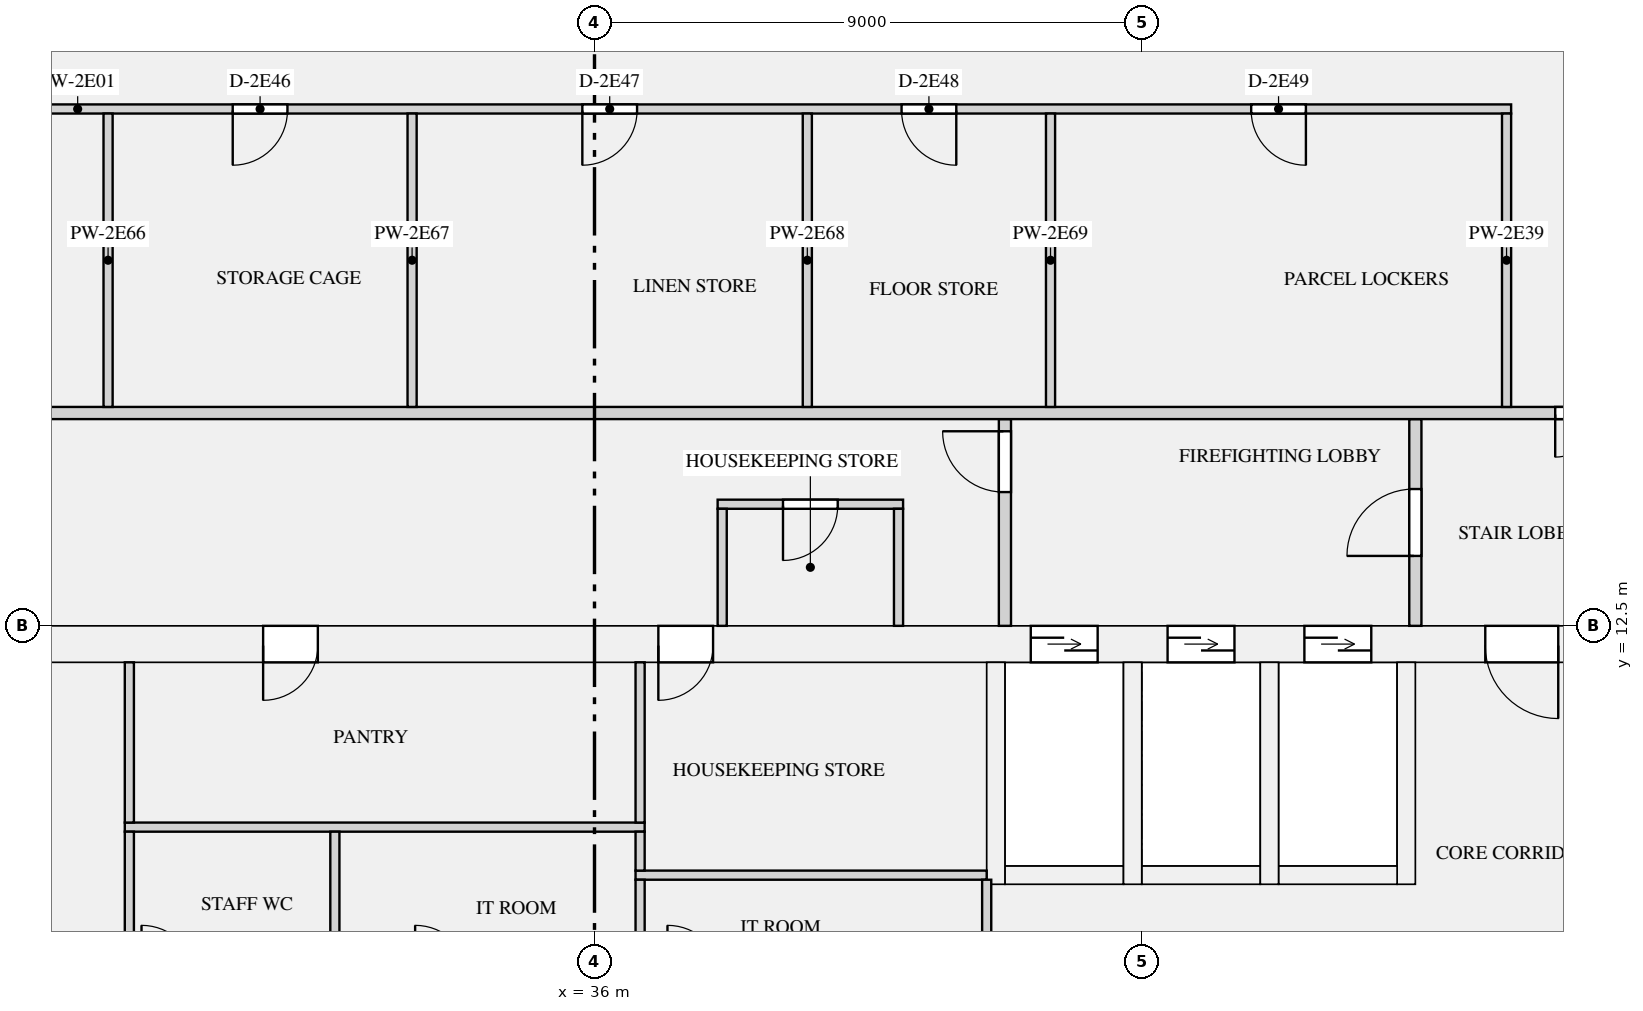
"""IFC4 building model, lengths in metres.
Left out: names, types, materials, properties, quantities, classifications, styles, units other than length and angle.
Written with IfcOpenShell. Run it as: python <this file> out.ifc"""

import sys

from ifc_helpers import new_model, si_unit, direction, frame, frame_2d, origin, place, context, subcontext, project, spatial, rectangle, extrude, element, fill, save


model = new_model("IFC4")
c1 = context("Model", 3, precision=1e-05, world=origin(), true_north=direction((0.0, 1.0)))
c2 = subcontext(c1, "Body", "Model", "MODEL_VIEW")
j1 = project(units=[si_unit("LENGTHUNIT", "METRE"), si_unit("PLANEANGLEUNIT", "RADIAN")], contexts=[c1])
p1 = place(None, origin())
s1 = spatial("IfcSite", under=j1, at=p1, CompositionType="ELEMENT")
p2 = place(p1, origin())
s2 = spatial("IfcBuilding", under=s1, at=p2, CompositionType="ELEMENT")
p3 = place(p2, frame((0.0, 0.0, 118.2)))
s3 = spatial("IfcBuildingStorey", under=s2, at=p3, CompositionType="ELEMENT", Elevation=118.2)
p4 = place(p3, frame((18.8, 12.2, 0.0), z_axis=(0.0, 0.0, 1.0), x_axis=(1.0, 0.0, 0.0)))
e1 = element("IfcWall", 1, at=p4, inside=s3, PredefinedType="SHEAR", context=c2, shape_type="SweptSolid", body=[
    extrude(rectangle(XDim=34.4, YDim=0.6, at=frame_2d((17.2, 0.0))), origin(), (0.0, 0.0, 1.0), 3.15),
])
p5 = place(p4, frame((24.375, 0.0, 0.0)))
e2 = element("IfcOpeningElement", 2, at=p5, cuts=e1, PredefinedType="OPENING", context=c2, shape_type="SweptSolid", body=[
    extrude(rectangle(XDim=1.1, YDim=2.1, at=frame_2d((0.55, 1.05))), frame((0.0, 0.31, 0.0), z_axis=(0.0, -1.0, 0.0), x_axis=(1.0, 0.0, 0.0)), (0.0, 0.0, 1.0), 0.62),
])
p6 = place(p4, frame((26.625, 0.0, 0.0)))
e3 = element("IfcOpeningElement", 3, at=p6, cuts=e1, PredefinedType="OPENING", context=c2, shape_type="SweptSolid", body=[
    extrude(rectangle(XDim=1.1, YDim=2.1, at=frame_2d((0.55, 1.05))), frame((0.0, 0.31, 0.0), z_axis=(0.0, -1.0, 0.0), x_axis=(1.0, 0.0, 0.0)), (0.0, 0.0, 1.0), 0.62),
])
p7 = place(p4, frame((28.875, 0.0, 0.0)))
e4 = element("IfcOpeningElement", 4, at=p7, cuts=e1, PredefinedType="OPENING", context=c2, shape_type="SweptSolid", body=[
    extrude(rectangle(XDim=1.1, YDim=2.1, at=frame_2d((0.55, 1.05))), frame((0.0, 0.31, 0.0), z_axis=(0.0, -1.0, 0.0), x_axis=(1.0, 0.0, 0.0)), (0.0, 0.0, 1.0), 0.62),
])
p8 = place(p4, frame((11.75, 0.0, 0.0)))
e5 = element("IfcOpeningElement", 5, at=p8, cuts=e1, PredefinedType="OPENING", context=c2, shape_type="SweptSolid", body=[
    extrude(rectangle(XDim=0.9, YDim=2.1, at=frame_2d((0.45, 1.05))), frame((0.0, 0.31, 0.0), z_axis=(0.0, -1.0, 0.0), x_axis=(1.0, 0.0, 0.0)), (0.0, 0.0, 1.0), 0.62),
])
p9 = place(p4, frame((18.25, 0.0, 0.0)))
e6 = element("IfcOpeningElement", 6, at=p9, cuts=e1, PredefinedType="OPENING", context=c2, shape_type="SweptSolid", body=[
    extrude(rectangle(XDim=0.9, YDim=2.1, at=frame_2d((0.45, 1.05))), frame((0.0, 0.31, 0.0), z_axis=(0.0, -1.0, 0.0), x_axis=(1.0, 0.0, 0.0)), (0.0, 0.0, 1.0), 0.62),
])
p10 = place(p4, frame((1.35, 0.0, 0.0)))
e7 = element("IfcOpeningElement", 7, at=p10, cuts=e1, PredefinedType="OPENING", context=c2, shape_type="SweptSolid", body=[
    extrude(rectangle(XDim=1.2, YDim=2.1, at=frame_2d((0.6, 1.05))), frame((0.0, 0.31, 0.0), z_axis=(0.0, -1.0, 0.0), x_axis=(1.0, 0.0, 0.0)), (0.0, 0.0, 1.0), 0.62),
])
p11 = place(p4, frame((31.85, 0.0, 0.0)))
e8 = element("IfcOpeningElement", 8, at=p11, cuts=e1, PredefinedType="OPENING", context=c2, shape_type="SweptSolid", body=[
    extrude(rectangle(XDim=1.2, YDim=2.1, at=frame_2d((0.6, 1.05))), frame((0.0, 0.31, 0.0), z_axis=(0.0, -1.0, 0.0), x_axis=(1.0, 0.0, 0.0)), (0.0, 0.0, 1.0), 0.62),
])
p12 = place(p3, frame((42.75, 8.4, 0.0), z_axis=(0.0, 0.0, 1.0), x_axis=(1.0, 0.0, 0.0)))
e9 = element("IfcWall", 9, at=p12, inside=s3, PredefinedType="SHEAR", context=c2, shape_type="SweptSolid", body=[
    extrude(rectangle(XDim=1.95, YDim=0.3, at=frame_2d((0.975, 0.0))), origin(), (0.0, 0.0, 1.0), 3.15),
])
p13 = place(p3, frame((42.6, 8.25, 0.0), z_axis=(0.0, 0.0, 1.0), x_axis=(0.0, 1.0, 0.0)))
e10 = element("IfcWall", 10, at=p13, inside=s3, PredefinedType="SHEAR", context=c2, shape_type="SweptSolid", body=[
    extrude(rectangle(XDim=3.65, YDim=0.3, at=frame_2d((1.825, 0.0))), origin(), (0.0, 0.0, 1.0), 3.15),
])
p14 = place(p3, frame((45.0, 8.4, 0.0), z_axis=(0.0, 0.0, 1.0), x_axis=(1.0, 0.0, 0.0)))
e11 = element("IfcWall", 11, at=p14, inside=s3, PredefinedType="SHEAR", context=c2, shape_type="SweptSolid", body=[
    extrude(rectangle(XDim=1.95, YDim=0.3, at=frame_2d((0.975, 0.0))), origin(), (0.0, 0.0, 1.0), 3.15),
])
p15 = place(p3, frame((44.85, 8.25, 0.0), z_axis=(0.0, 0.0, 1.0), x_axis=(0.0, 1.0, 0.0)))
e12 = element("IfcWall", 12, at=p15, inside=s3, PredefinedType="SHEAR", context=c2, shape_type="SweptSolid", body=[
    extrude(rectangle(XDim=3.65, YDim=0.3, at=frame_2d((1.825, 0.0))), origin(), (0.0, 0.0, 1.0), 3.15),
])
p16 = place(p3, frame((47.25, 8.4, 0.0), z_axis=(0.0, 0.0, 1.0), x_axis=(1.0, 0.0, 0.0)))
e13 = element("IfcWall", 13, at=p16, inside=s3, PredefinedType="SHEAR", context=c2, shape_type="SweptSolid", body=[
    extrude(rectangle(XDim=1.95, YDim=0.3, at=frame_2d((0.975, 0.0))), origin(), (0.0, 0.0, 1.0), 3.15),
])
for number, where, z_axis, x_axis in (
    (14, (47.1, 8.25, 0.0), (0.0, 0.0, 1.0), (0.0, 1.0, 0.0)),
    (15, (49.35, 8.25, 0.0), (0.0, 0.0, 1.0), (0.0, 1.0, 0.0)),
):
    element("IfcWall", number, at=place(p3, frame(where, z_axis=z_axis, x_axis=x_axis)), inside=s3, PredefinedType="SHEAR", context=c2, shape_type="SweptSolid", body=[
        extrude(rectangle(XDim=3.65, YDim=0.3, at=frame_2d((1.825, 0.0))), origin(), (0.0, 0.0, 1.0), 3.15),
    ])
p17 = place(p3, frame((36.675, 8.4, 0.0), z_axis=(0.0, 0.0, 1.0), x_axis=(1.0, 0.0, 0.0)))
e16 = element("IfcWall", 16, at=p17, inside=s3, PredefinedType="PARTITIONING", context=c2, shape_type="SweptSolid", body=[
    extrude(rectangle(XDim=5.775, YDim=0.15, at=frame_2d((2.887, 0.0))), origin(), (0.0, 0.0, 1.0), 2.83),
])
p18 = place(p3, frame((28.275, 9.19, 0.0), z_axis=(0.0, 0.0, 1.0), x_axis=(1.0, 0.0, 0.0)))
e17 = element("IfcWall", 17, at=p18, inside=s3, PredefinedType="PARTITIONING", context=c2, shape_type="SweptSolid", body=[
    extrude(rectangle(XDim=8.55, YDim=0.15, at=frame_2d((4.275, 0.0))), origin(), (0.0, 0.0, 1.0), 2.83),
])
p19 = place(p3, frame((38.025, 14.5, 0.0), z_axis=(0.0, 0.0, 1.0), x_axis=(1.0, 0.0, 0.0)))
e18 = element("IfcWall", 18, at=p19, inside=s3, PredefinedType="PARTITIONING", context=c2, shape_type="SweptSolid", body=[
    extrude(rectangle(XDim=3.05, YDim=0.15, at=frame_2d((1.525, 0.0))), origin(), (0.0, 0.0, 1.0), 2.83),
])
p20 = place(p19, frame((1.075, 0.0, 0.0)))
e19 = element("IfcOpeningElement", 19, at=p20, cuts=e18, PredefinedType="OPENING", context=c2, shape_type="SweptSolid", body=[
    extrude(rectangle(XDim=0.9, YDim=2.1, at=frame_2d((0.45, 1.05))), frame((0.0, 0.085, 0.0), z_axis=(0.0, -1.0, 0.0), x_axis=(1.0, 0.0, 0.0)), (0.0, 0.0, 1.0), 0.17),
])
p21 = place(p3, frame((42.45, 6.65, 0.0), z_axis=(0.0, 0.0, 1.0), x_axis=(0.0, 1.0, 0.0)))
e20 = element("IfcWall", 20, at=p21, inside=s3, PredefinedType="PARTITIONING", context=c2, shape_type="SweptSolid", body=[
    extrude(rectangle(XDim=1.675, YDim=0.15, at=frame_2d((0.837, 0.0))), origin(), (0.0, 0.0, 1.0), 2.83),
])
for number, where, z_axis, x_axis in (
    (21, (28.35, 6.725, 0.0), (0.0, 0.0, 1.0), (0.0, 1.0, 0.0)),
    (22, (31.73, 6.725, 0.0), (0.0, 0.0, 1.0), (0.0, 1.0, 0.0)),
):
    element("IfcWall", number, at=place(p3, frame(where, z_axis=z_axis, x_axis=x_axis)), inside=s3, PredefinedType="PARTITIONING", context=c2, shape_type="SweptSolid", body=[
        extrude(rectangle(XDim=2.39, YDim=0.15, at=frame_2d((1.195, 0.0))), origin(), (0.0, 0.0, 1.0), 2.83),
    ])
p22 = place(p3, frame((36.75, 6.725, 0.0), z_axis=(0.0, 0.0, 1.0), x_axis=(0.0, 1.0, 0.0)))
e23 = element("IfcWall", 23, at=p22, inside=s3, PredefinedType="PARTITIONING", context=c2, shape_type="SweptSolid", body=[
    extrude(rectangle(XDim=1.6, YDim=0.15, at=frame_2d((0.8, 0.0))), origin(), (0.0, 0.0, 1.0), 2.83),
])
p23 = place(p3, frame((36.75, 8.475, 0.0), z_axis=(0.0, 0.0, 1.0), x_axis=(0.0, 1.0, 0.0)))
e24 = element("IfcWall", 24, at=p23, inside=s3, PredefinedType="PARTITIONING", context=c2, shape_type="SweptSolid", body=[
    extrude(rectangle(XDim=0.64, YDim=0.15, at=frame_2d((0.32, 0.0))), origin(), (0.0, 0.0, 1.0), 2.83),
])
for number, where, z_axis, x_axis in (
    (25, (28.35, 9.265, 0.0), (0.0, 0.0, 1.0), (0.0, 1.0, 0.0)),
    (26, (36.75, 9.265, 0.0), (0.0, 0.0, 1.0), (0.0, 1.0, 0.0)),
):
    element("IfcWall", number, at=place(p3, frame(where, z_axis=z_axis, x_axis=x_axis)), inside=s3, PredefinedType="PARTITIONING", context=c2, shape_type="SweptSolid", body=[
        extrude(rectangle(XDim=2.635, YDim=0.15, at=frame_2d((1.317, 0.0))), origin(), (0.0, 0.0, 1.0), 2.83),
    ])
for number, where, z_axis, x_axis in (
    (27, (38.1, 12.5, 0.0), (0.0, 0.0, 1.0), (0.0, 1.0, 0.0)),
    (28, (41.0, 12.5, 0.0), (0.0, 0.0, 1.0), (0.0, 1.0, 0.0)),
):
    element("IfcWall", number, at=place(p3, frame(where, z_axis=z_axis, x_axis=x_axis)), inside=s3, PredefinedType="PARTITIONING", context=c2, shape_type="SweptSolid", body=[
        extrude(rectangle(XDim=1.925, YDim=0.15, at=frame_2d((0.962, 0.0))), origin(), (0.0, 0.0, 1.0), 2.83),
    ])
p24 = place(p3, frame((42.75, 12.5, 0.0), z_axis=(0.0, 0.0, 1.0), x_axis=(0.0, 1.0, 0.0)))
e29 = element("IfcWall", 29, at=p24, inside=s3, PredefinedType="PARTITIONING", context=c2, shape_type="SweptSolid", body=[
    extrude(rectangle(XDim=3.4, YDim=0.2, at=frame_2d((1.7, 0.0))), origin(), (0.0, 0.0, 1.0), 2.83),
])
p25 = place(p24, frame((2.2, 0.0, 0.0)))
e30 = element("IfcOpeningElement", 30, at=p25, cuts=e29, PredefinedType="OPENING", context=c2, shape_type="SweptSolid", body=[
    extrude(rectangle(XDim=1.0, YDim=2.1, at=frame_2d((0.5, 1.05))), frame((0.0, 0.11, 0.0), z_axis=(0.0, -1.0, 0.0), x_axis=(1.0, 0.0, 0.0)), (0.0, 0.0, 1.0), 0.22),
])
p26 = place(p3, frame((49.5, 12.5, 0.0), z_axis=(0.0, 0.0, 1.0), x_axis=(0.0, 1.0, 0.0)))
e31 = element("IfcWall", 31, at=p26, inside=s3, PredefinedType="PARTITIONING", context=c2, shape_type="SweptSolid", body=[
    extrude(rectangle(XDim=3.4, YDim=0.2, at=frame_2d((1.7, 0.0))), origin(), (0.0, 0.0, 1.0), 2.83),
])
p27 = place(p26, frame((1.15, 0.0, 0.0)))
e32 = element("IfcOpeningElement", 32, at=p27, cuts=e31, PredefinedType="OPENING", context=c2, shape_type="SweptSolid", body=[
    extrude(rectangle(XDim=1.1, YDim=2.1, at=frame_2d((0.55, 1.05))), frame((0.0, 0.11, 0.0), z_axis=(0.0, -1.0, 0.0), x_axis=(1.0, 0.0, 0.0)), (0.0, 0.0, 1.0), 0.22),
])
p28 = place(p3, frame((20.925, 21.0, 0.0), z_axis=(0.0, 0.0, 1.0), x_axis=(1.0, 0.0, 0.0)))
e33 = element("IfcWall", 33, at=p28, inside=s3, PredefinedType="PARTITIONING", context=c2, shape_type="SweptSolid", body=[
    extrude(rectangle(XDim=30.15, YDim=0.15, at=frame_2d((15.075, 0.0))), origin(), (0.0, 0.0, 1.0), 2.83),
])
p29 = place(p28, frame((3.125, 0.0, 0.0)))
e34 = element("IfcOpeningElement", 34, at=p29, cuts=e33, PredefinedType="OPENING", context=c2, shape_type="SweptSolid", body=[
    extrude(rectangle(XDim=0.9, YDim=2.1, at=frame_2d((0.45, 1.05))), frame((0.0, 0.085, 0.0), z_axis=(0.0, -1.0, 0.0), x_axis=(1.0, 0.0, 0.0)), (0.0, 0.0, 1.0), 0.17),
])
p30 = place(p28, frame((9.125, 0.0, 0.0)))
e35 = element("IfcOpeningElement", 35, at=p30, cuts=e33, PredefinedType="OPENING", context=c2, shape_type="SweptSolid", body=[
    extrude(rectangle(XDim=0.9, YDim=2.1, at=frame_2d((0.45, 1.05))), frame((0.0, 0.085, 0.0), z_axis=(0.0, -1.0, 0.0), x_axis=(1.0, 0.0, 0.0)), (0.0, 0.0, 1.0), 0.17),
])
p31 = place(p28, frame((14.875, 0.0, 0.0)))
e36 = element("IfcOpeningElement", 36, at=p31, cuts=e33, PredefinedType="OPENING", context=c2, shape_type="SweptSolid", body=[
    extrude(rectangle(XDim=0.9, YDim=2.1, at=frame_2d((0.45, 1.05))), frame((0.0, 0.085, 0.0), z_axis=(0.0, -1.0, 0.0), x_axis=(1.0, 0.0, 0.0)), (0.0, 0.0, 1.0), 0.17),
])
p32 = place(p28, frame((20.125, 0.0, 0.0)))
e37 = element("IfcOpeningElement", 37, at=p32, cuts=e33, PredefinedType="OPENING", context=c2, shape_type="SweptSolid", body=[
    extrude(rectangle(XDim=0.9, YDim=2.1, at=frame_2d((0.45, 1.05))), frame((0.0, 0.085, 0.0), z_axis=(0.0, -1.0, 0.0), x_axis=(1.0, 0.0, 0.0)), (0.0, 0.0, 1.0), 0.17),
])
p33 = place(p28, frame((25.875, 0.0, 0.0)))
e38 = element("IfcOpeningElement", 38, at=p33, cuts=e33, PredefinedType="OPENING", context=c2, shape_type="SweptSolid", body=[
    extrude(rectangle(XDim=0.9, YDim=2.1, at=frame_2d((0.45, 1.05))), frame((0.0, 0.085, 0.0), z_axis=(0.0, -1.0, 0.0), x_axis=(1.0, 0.0, 0.0)), (0.0, 0.0, 1.0), 0.17),
])
p34 = place(p3, frame((17.9, 16.0, 0.0), z_axis=(0.0, 0.0, 1.0), x_axis=(1.0, 0.0, 0.0)))
e39 = element("IfcWall", 39, at=p34, inside=s3, PredefinedType="PARTITIONING", context=c2, shape_type="SweptSolid", body=[
    extrude(rectangle(XDim=36.2, YDim=0.2, at=frame_2d((18.1, 0.0))), origin(), (0.0, 0.0, 1.0), 2.83),
])
p35 = place(p34, frame((0.9, 0.0, 0.0)))
e40 = element("IfcOpeningElement", 40, at=p35, cuts=e39, PredefinedType="OPENING", context=c2, shape_type="SweptSolid", body=[
    extrude(rectangle(XDim=1.4, YDim=2.1, at=frame_2d((0.7, 1.05))), frame((0.0, 0.11, 0.0), z_axis=(0.0, -1.0, 0.0), x_axis=(1.0, 0.0, 0.0)), (0.0, 0.0, 1.0), 0.22),
])
p36 = place(p34, frame((33.9, 0.0, 0.0)))
e41 = element("IfcOpeningElement", 41, at=p36, cuts=e39, PredefinedType="OPENING", context=c2, shape_type="SweptSolid", body=[
    extrude(rectangle(XDim=1.4, YDim=2.1, at=frame_2d((0.7, 1.05))), frame((0.0, 0.11, 0.0), z_axis=(0.0, -1.0, 0.0), x_axis=(1.0, 0.0, 0.0)), (0.0, 0.0, 1.0), 0.22),
])
for number, where, z_axis, x_axis in (
    (42, (51.0, 16.1, 0.0), (0.0, 0.0, 1.0), (0.0, 1.0, 0.0)),
    (43, (28.0, 16.1, 0.0), (0.0, 0.0, 1.0), (0.0, 1.0, 0.0)),
    (44, (33.0, 16.1, 0.0), (0.0, 0.0, 1.0), (0.0, 1.0, 0.0)),
    (45, (39.5, 16.1, 0.0), (0.0, 0.0, 1.0), (0.0, 1.0, 0.0)),
    (46, (43.5, 16.1, 0.0), (0.0, 0.0, 1.0), (0.0, 1.0, 0.0)),
):
    element("IfcWall", number, at=place(p3, frame(where, z_axis=z_axis, x_axis=x_axis)), inside=s3, PredefinedType="PARTITIONING", context=c2, shape_type="SweptSolid", body=[
        extrude(rectangle(XDim=4.825, YDim=0.15, at=frame_2d((2.413, 0.0))), origin(), (0.0, 0.0, 1.0), 2.83),
    ])
p37 = place(p5, origin())
e47 = element("IfcDoor", 47, at=p37, inside=s3, OperationType="DOUBLE_DOOR_SLIDING", PredefinedType="DOOR", context=c2, shape_type="SweptSolid", body=[
    extrude(rectangle(XDim=1.1, YDim=2.1, at=frame_2d((0.55, 1.05))), frame((0.0, 0.025, 0.0), z_axis=(0.0, -1.0, 0.0), x_axis=(1.0, 0.0, 0.0)), (0.0, 0.0, 1.0), 0.05),
])
fill(e2, e47)
p38 = place(p6, origin())
e48 = element("IfcDoor", 48, at=p38, inside=s3, OperationType="DOUBLE_DOOR_SLIDING", PredefinedType="DOOR", context=c2, shape_type="SweptSolid", body=[
    extrude(rectangle(XDim=1.1, YDim=2.1, at=frame_2d((0.55, 1.05))), frame((0.0, 0.025, 0.0), z_axis=(0.0, -1.0, 0.0), x_axis=(1.0, 0.0, 0.0)), (0.0, 0.0, 1.0), 0.05),
])
fill(e3, e48)
p39 = place(p7, origin())
e49 = element("IfcDoor", 49, at=p39, inside=s3, OperationType="DOUBLE_DOOR_SLIDING", PredefinedType="DOOR", context=c2, shape_type="SweptSolid", body=[
    extrude(rectangle(XDim=1.1, YDim=2.1, at=frame_2d((0.55, 1.05))), frame((0.0, 0.025, 0.0), z_axis=(0.0, -1.0, 0.0), x_axis=(1.0, 0.0, 0.0)), (0.0, 0.0, 1.0), 0.05),
])
fill(e4, e49)
p40 = place(p20, frame((0.9, 0.0, 0.0), z_axis=(0.0, 0.0, 1.0), x_axis=(-1.0, 0.0, 0.0)))
e50 = element("IfcDoor", 50, at=p40, inside=s3, OperationType="SINGLE_SWING_RIGHT", PredefinedType="DOOR", context=c2, shape_type="SweptSolid", body=[
    extrude(rectangle(XDim=0.9, YDim=2.1, at=frame_2d((0.45, 1.05))), frame((0.0, 0.025, 0.0), z_axis=(0.0, -1.0, 0.0), x_axis=(1.0, 0.0, 0.0)), (0.0, 0.0, 1.0), 0.05),
])
fill(e19, e50)
p41 = place(p8, frame((0.9, 0.0, 0.0), z_axis=(0.0, 0.0, 1.0), x_axis=(-1.0, 0.0, 0.0)))
e51 = element("IfcDoor", 51, at=p41, inside=s3, OperationType="SINGLE_SWING_RIGHT", PredefinedType="DOOR", context=c2, shape_type="SweptSolid", body=[
    extrude(rectangle(XDim=0.9, YDim=2.1, at=frame_2d((0.45, 1.05))), frame((0.0, 0.025, 0.0), z_axis=(0.0, -1.0, 0.0), x_axis=(1.0, 0.0, 0.0)), (0.0, 0.0, 1.0), 0.05),
])
fill(e5, e51)
p42 = place(p9, frame((0.9, 0.0, 0.0), z_axis=(0.0, 0.0, 1.0), x_axis=(-1.0, 0.0, 0.0)))
e52 = element("IfcDoor", 52, at=p42, inside=s3, OperationType="SINGLE_SWING_RIGHT", PredefinedType="DOOR", context=c2, shape_type="SweptSolid", body=[
    extrude(rectangle(XDim=0.9, YDim=2.1, at=frame_2d((0.45, 1.05))), frame((0.0, 0.025, 0.0), z_axis=(0.0, -1.0, 0.0), x_axis=(1.0, 0.0, 0.0)), (0.0, 0.0, 1.0), 0.05),
])
fill(e6, e52)
p43 = place(p11, frame((1.2, 0.0, 0.0), z_axis=(0.0, 0.0, 1.0), x_axis=(-1.0, 0.0, 0.0)))
e53 = element("IfcDoor", 53, at=p43, inside=s3, OperationType="SINGLE_SWING_LEFT", PredefinedType="DOOR", context=c2, shape_type="SweptSolid", body=[
    extrude(rectangle(XDim=1.2, YDim=2.1, at=frame_2d((0.6, 1.05))), frame((0.0, 0.025, 0.0), z_axis=(0.0, -1.0, 0.0), x_axis=(1.0, 0.0, 0.0)), (0.0, 0.0, 1.0), 0.05),
])
fill(e8, e53)
p44 = place(p25, origin())
e54 = element("IfcDoor", 54, at=p44, inside=s3, OperationType="SINGLE_SWING_RIGHT", PredefinedType="DOOR", context=c2, shape_type="SweptSolid", body=[
    extrude(rectangle(XDim=1.0, YDim=2.1, at=frame_2d((0.5, 1.05))), frame((0.0, 0.025, 0.0), z_axis=(0.0, -1.0, 0.0), x_axis=(1.0, 0.0, 0.0)), (0.0, 0.0, 1.0), 0.05),
])
fill(e30, e54)
p45 = place(p27, origin())
e55 = element("IfcDoor", 55, at=p45, inside=s3, OperationType="SINGLE_SWING_LEFT", PredefinedType="DOOR", context=c2, shape_type="SweptSolid", body=[
    extrude(rectangle(XDim=1.1, YDim=2.1, at=frame_2d((0.55, 1.05))), frame((0.0, 0.025, 0.0), z_axis=(0.0, -1.0, 0.0), x_axis=(1.0, 0.0, 0.0)), (0.0, 0.0, 1.0), 0.05),
])
fill(e32, e55)
p46 = place(p36, frame((1.4, 0.0, 0.0), z_axis=(0.0, 0.0, 1.0), x_axis=(-1.0, 0.0, 0.0)))
e56 = element("IfcDoor", 56, at=p46, inside=s3, OperationType="DOUBLE_DOOR_SINGLE_SWING", PredefinedType="DOOR", context=c2, shape_type="SweptSolid", body=[
    extrude(rectangle(XDim=1.4, YDim=2.1, at=frame_2d((0.7, 1.05))), frame((0.0, 0.025, 0.0), z_axis=(0.0, -1.0, 0.0), x_axis=(1.0, 0.0, 0.0)), (0.0, 0.0, 1.0), 0.05),
])
fill(e41, e56)
p47 = place(p30, frame((0.9, 0.0, 0.0), z_axis=(0.0, 0.0, 1.0), x_axis=(-1.0, 0.0, 0.0)))
e57 = element("IfcDoor", 57, at=p47, inside=s3, OperationType="SINGLE_SWING_RIGHT", PredefinedType="DOOR", context=c2, shape_type="SweptSolid", body=[
    extrude(rectangle(XDim=0.9, YDim=2.1, at=frame_2d((0.45, 1.05))), frame((0.0, 0.025, 0.0), z_axis=(0.0, -1.0, 0.0), x_axis=(1.0, 0.0, 0.0)), (0.0, 0.0, 1.0), 0.05),
])
fill(e35, e57)
p48 = place(p31, frame((0.9, 0.0, 0.0), z_axis=(0.0, 0.0, 1.0), x_axis=(-1.0, 0.0, 0.0)))
e58 = element("IfcDoor", 58, at=p48, inside=s3, OperationType="SINGLE_SWING_RIGHT", PredefinedType="DOOR", context=c2, shape_type="SweptSolid", body=[
    extrude(rectangle(XDim=0.9, YDim=2.1, at=frame_2d((0.45, 1.05))), frame((0.0, 0.025, 0.0), z_axis=(0.0, -1.0, 0.0), x_axis=(1.0, 0.0, 0.0)), (0.0, 0.0, 1.0), 0.05),
])
fill(e36, e58)
p49 = place(p32, frame((0.9, 0.0, 0.0), z_axis=(0.0, 0.0, 1.0), x_axis=(-1.0, 0.0, 0.0)))
e59 = element("IfcDoor", 59, at=p49, inside=s3, OperationType="SINGLE_SWING_LEFT", PredefinedType="DOOR", context=c2, shape_type="SweptSolid", body=[
    extrude(rectangle(XDim=0.9, YDim=2.1, at=frame_2d((0.45, 1.05))), frame((0.0, 0.025, 0.0), z_axis=(0.0, -1.0, 0.0), x_axis=(1.0, 0.0, 0.0)), (0.0, 0.0, 1.0), 0.05),
])
fill(e37, e59)
p50 = place(p33, frame((0.9, 0.0, 0.0), z_axis=(0.0, 0.0, 1.0), x_axis=(-1.0, 0.0, 0.0)))
e60 = element("IfcDoor", 60, at=p50, inside=s3, OperationType="SINGLE_SWING_LEFT", PredefinedType="DOOR", context=c2, shape_type="SweptSolid", body=[
    extrude(rectangle(XDim=0.9, YDim=2.1, at=frame_2d((0.45, 1.05))), frame((0.0, 0.025, 0.0), z_axis=(0.0, -1.0, 0.0), x_axis=(1.0, 0.0, 0.0)), (0.0, 0.0, 1.0), 0.05),
])
fill(e38, e60)
save(model, sys.argv[1])
